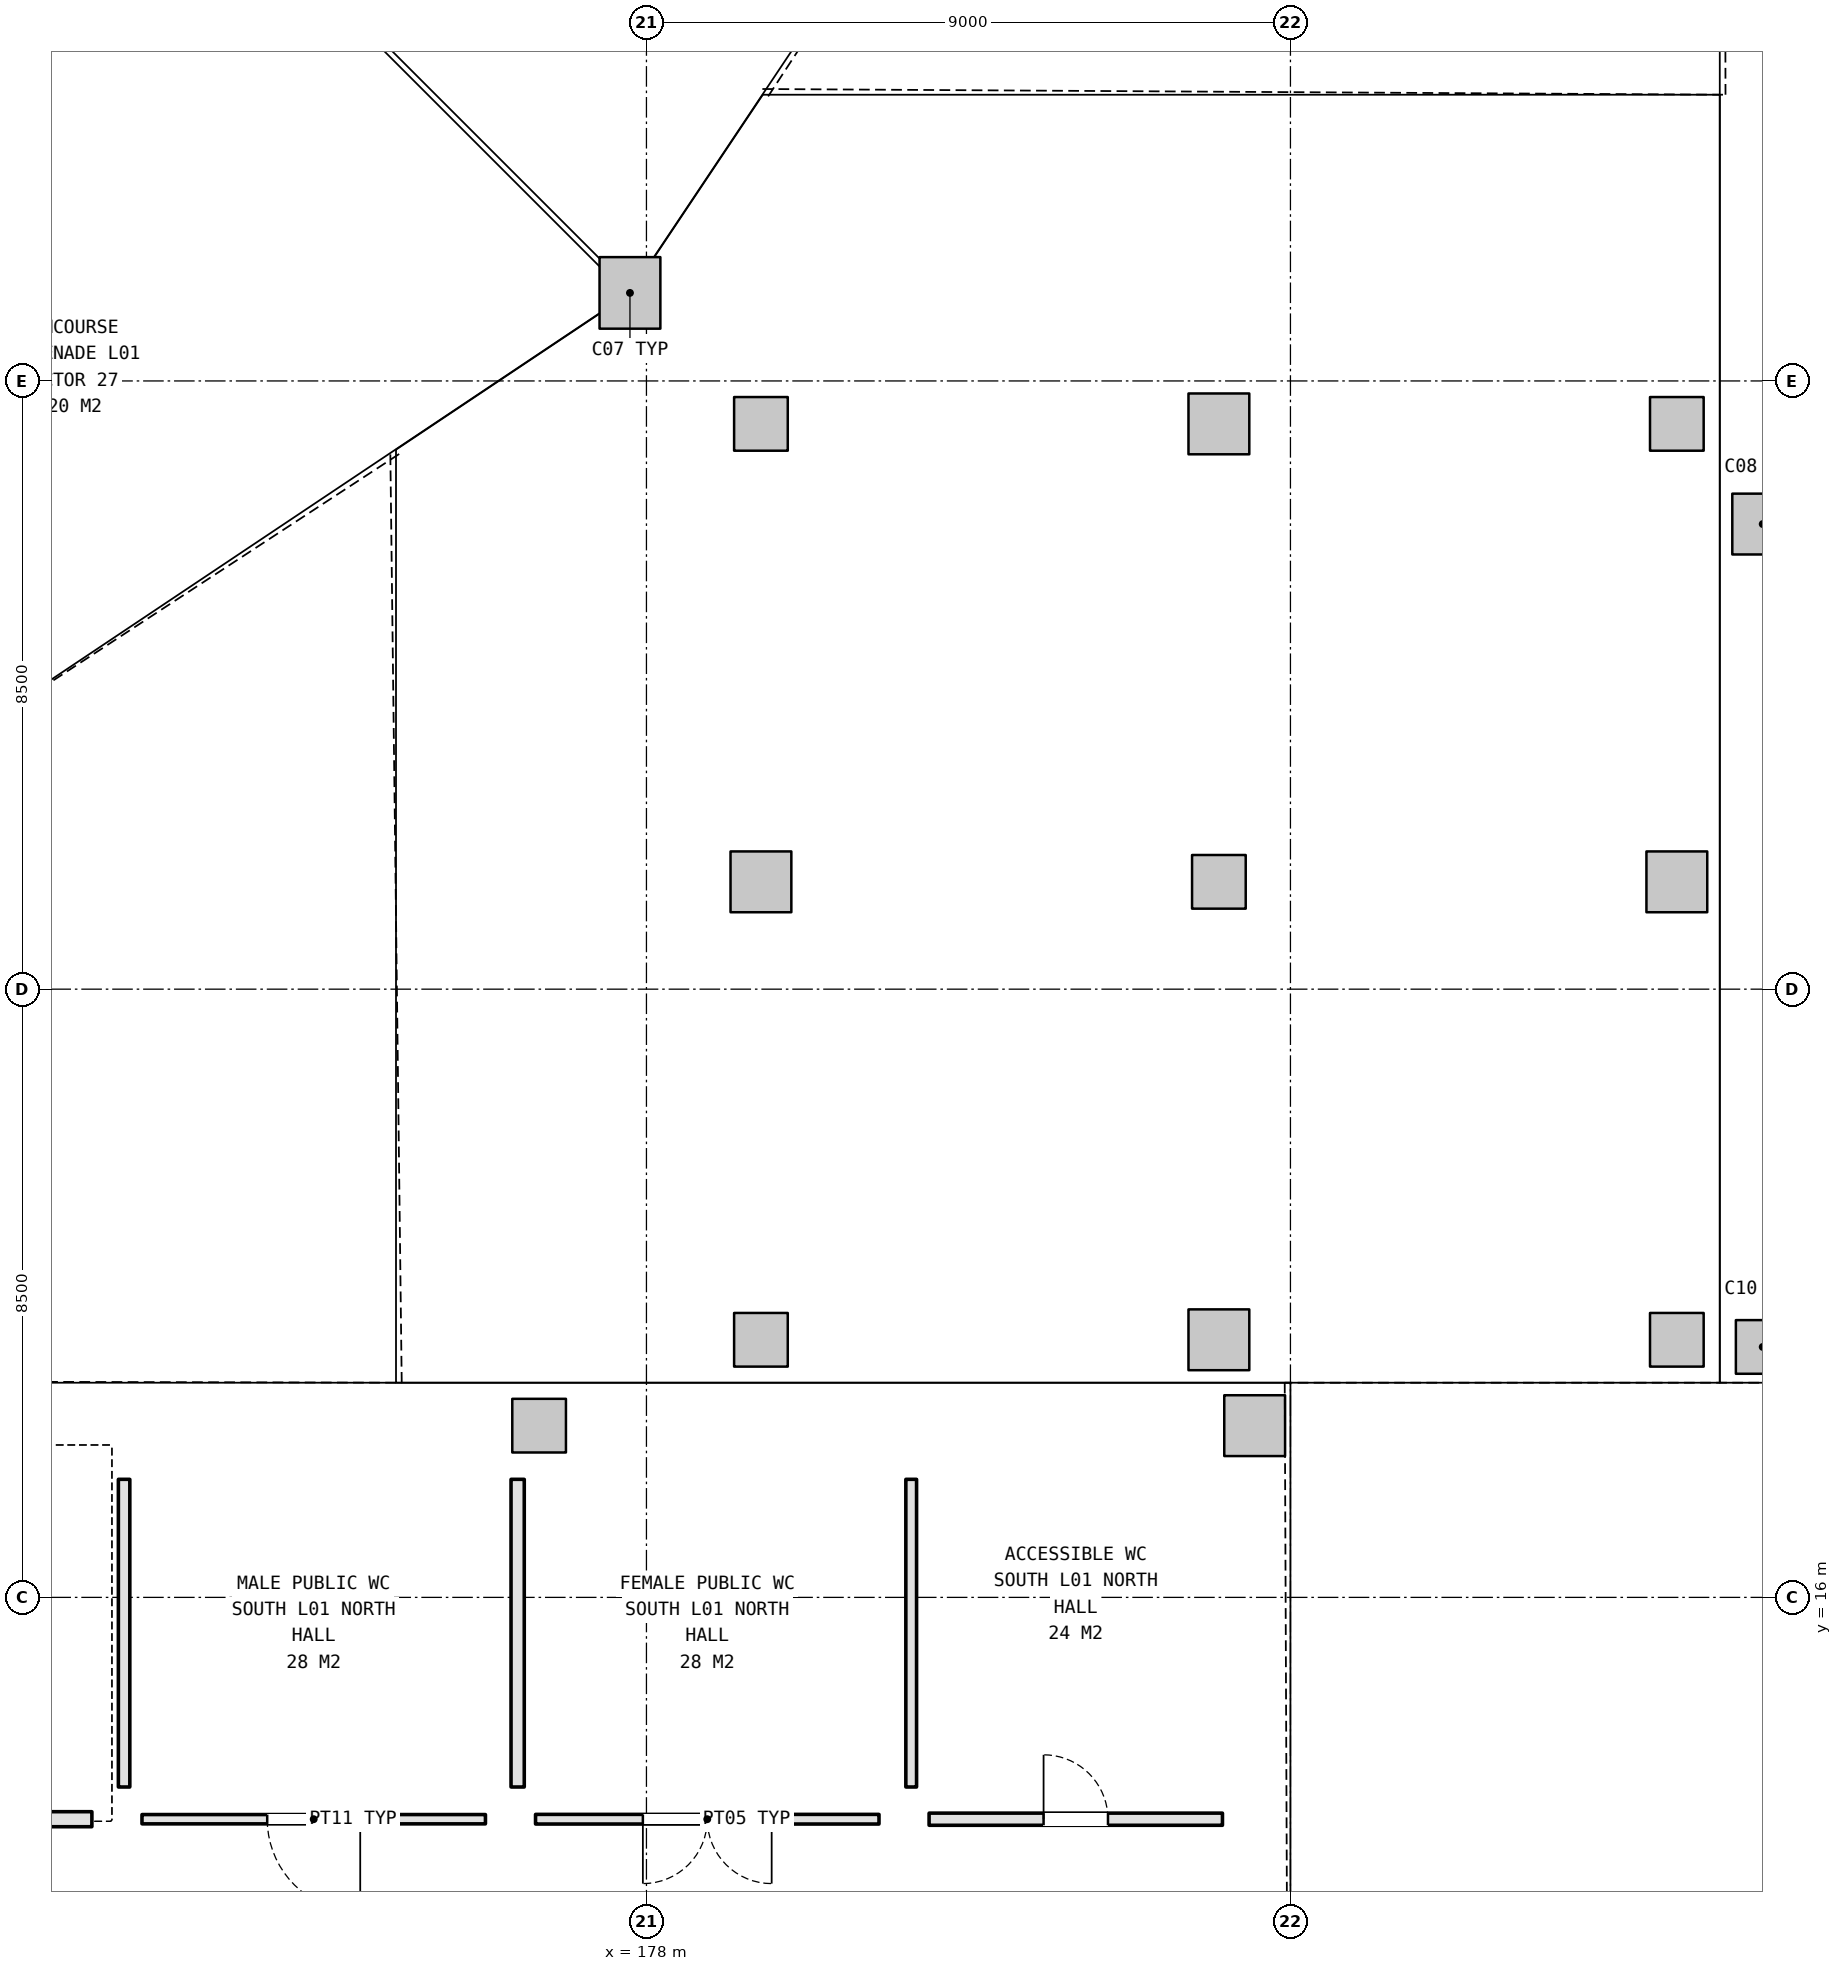
"""IFC4 building model, lengths in metres.
Left out: names, types, materials, properties, quantities, classifications, styles, units other than length and angle.
Written with IfcOpenShell. Run it as: python <this file> out.ifc"""

import sys

from ifc_helpers import new_model, si_unit, direction, frame, frame_2d, origin, origin_2d, place, context, subcontext, project, spatial, rectangle, extrude, element, fill, save


model = new_model("IFC4")
c1 = context("Model", 3, precision=1e-05, world=origin(), true_north=direction((0.0, 1.0)))
c2 = subcontext(c1, "Body", "Model", "MODEL_VIEW")
j1 = project(units=[si_unit("LENGTHUNIT", "METRE"), si_unit("PLANEANGLEUNIT", "RADIAN")], contexts=[c1])
p1 = place(None, origin())
s1 = spatial("IfcSite", under=j1, at=p1, CompositionType="ELEMENT")
p2 = place(p1, origin())
s2 = spatial("IfcBuilding", under=s1, at=p2, CompositionType="ELEMENT")
p3 = place(p2, frame((0.0, 0.0, 5.4)))
s3 = spatial("IfcBuildingStorey", under=s2, at=p3, CompositionType="ELEMENT", Elevation=5.4)
p4 = place(p3, frame((177.77, 34.23, 0.0), z_axis=(0.0, 0.0, 1.0), x_axis=(1.0, 0.0, 0.0)))
e1 = element("IfcColumn", 1, at=p4, inside=s3, PredefinedType="COLUMN", context=c2, shape_type="SweptSolid", body=[
    extrude(rectangle(XDim=0.85, YDim=1.0, at=origin_2d()), origin(), (0.0, 0.0, 1.0), 5.4),
])
p5 = place(p3, frame((193.6, 19.5, 0.0), z_axis=(0.0, 0.0, 1.0), x_axis=(1.0, 0.0, 0.0)))
e2 = element("IfcColumn", 2, at=p5, inside=s3, PredefinedType="COLUMN", context=c2, shape_type="SweptSolid", body=[
    extrude(rectangle(XDim=0.75, YDim=0.75, at=origin_2d()), origin(), (0.0, 0.0, 1.0), 5.4),
])
p6 = place(p3, frame((193.6, 31.0, 0.0), z_axis=(0.0, 0.0, 1.0), x_axis=(1.0, 0.0, 0.0)))
e3 = element("IfcColumn", 3, at=p6, inside=s3, PredefinedType="COLUMN", context=c2, shape_type="SweptSolid", body=[
    extrude(rectangle(XDim=0.85, YDim=0.85, at=origin_2d()), origin(), (0.0, 0.0, 1.0), 5.4),
])
p7 = place(p3, frame((176.5, 18.4, 0.0), z_axis=(0.0, 0.0, 1.0), x_axis=(1.0, 0.0, 0.0)))
e4 = element("IfcColumn", 4, at=p7, inside=s3, PredefinedType="COLUMN", context=c2, shape_type="SweptSolid", body=[
    extrude(rectangle(XDim=0.75, YDim=0.75, at=origin_2d()), origin(), (0.0, 0.0, 1.0), 5.4),
])
p8 = place(p3, frame((186.5, 18.4, 0.0), z_axis=(0.0, 0.0, 1.0), x_axis=(1.0, 0.0, 0.0)))
e5 = element("IfcColumn", 5, at=p8, inside=s3, PredefinedType="COLUMN", context=c2, shape_type="SweptSolid", body=[
    extrude(rectangle(XDim=0.85, YDim=0.85, at=origin_2d()), origin(), (0.0, 0.0, 1.0), 5.4),
])
p9 = place(p3, frame((179.6, 19.6, 0.0), z_axis=(0.0, 0.0, 1.0), x_axis=(1.0, 0.0, 0.0)))
e6 = element("IfcColumn", 6, at=p9, inside=s3, PredefinedType="COLUMN", context=c2, shape_type="SweptSolid", body=[
    extrude(rectangle(XDim=0.75, YDim=0.75, at=origin_2d()), origin(), (0.0, 0.0, 1.0), 5.4),
])
p10 = place(p3, frame((179.6, 26.0, 0.0), z_axis=(0.0, 0.0, 1.0), x_axis=(1.0, 0.0, 0.0)))
e7 = element("IfcColumn", 7, at=p10, inside=s3, PredefinedType="COLUMN", context=c2, shape_type="SweptSolid", body=[
    extrude(rectangle(XDim=0.85, YDim=0.85, at=origin_2d()), origin(), (0.0, 0.0, 1.0), 5.4),
])
p11 = place(p3, frame((179.6, 32.4, 0.0), z_axis=(0.0, 0.0, 1.0), x_axis=(1.0, 0.0, 0.0)))
e8 = element("IfcColumn", 8, at=p11, inside=s3, PredefinedType="COLUMN", context=c2, shape_type="SweptSolid", body=[
    extrude(rectangle(XDim=0.75, YDim=0.75, at=origin_2d()), origin(), (0.0, 0.0, 1.0), 5.4),
])
p12 = place(p3, frame((186.0, 19.6, 0.0), z_axis=(0.0, 0.0, 1.0), x_axis=(1.0, 0.0, 0.0)))
e9 = element("IfcColumn", 9, at=p12, inside=s3, PredefinedType="COLUMN", context=c2, shape_type="SweptSolid", body=[
    extrude(rectangle(XDim=0.85, YDim=0.85, at=origin_2d()), origin(), (0.0, 0.0, 1.0), 5.4),
])
p13 = place(p3, frame((186.0, 26.0, 0.0), z_axis=(0.0, 0.0, 1.0), x_axis=(1.0, 0.0, 0.0)))
e10 = element("IfcColumn", 10, at=p13, inside=s3, PredefinedType="COLUMN", context=c2, shape_type="SweptSolid", body=[
    extrude(rectangle(XDim=0.75, YDim=0.75, at=origin_2d()), origin(), (0.0, 0.0, 1.0), 5.4),
])
p14 = place(p3, frame((186.0, 32.4, 0.0), z_axis=(0.0, 0.0, 1.0), x_axis=(1.0, 0.0, 0.0)))
e11 = element("IfcColumn", 11, at=p14, inside=s3, PredefinedType="COLUMN", context=c2, shape_type="SweptSolid", body=[
    extrude(rectangle(XDim=0.85, YDim=0.85, at=origin_2d()), origin(), (0.0, 0.0, 1.0), 5.4),
])
p15 = place(p3, frame((192.4, 19.6, 0.0), z_axis=(0.0, 0.0, 1.0), x_axis=(1.0, 0.0, 0.0)))
e12 = element("IfcColumn", 12, at=p15, inside=s3, PredefinedType="COLUMN", context=c2, shape_type="SweptSolid", body=[
    extrude(rectangle(XDim=0.75, YDim=0.75, at=origin_2d()), origin(), (0.0, 0.0, 1.0), 5.4),
])
p16 = place(p3, frame((192.4, 26.0, 0.0), z_axis=(0.0, 0.0, 1.0), x_axis=(1.0, 0.0, 0.0)))
e13 = element("IfcColumn", 13, at=p16, inside=s3, PredefinedType="COLUMN", context=c2, shape_type="SweptSolid", body=[
    extrude(rectangle(XDim=0.85, YDim=0.85, at=origin_2d()), origin(), (0.0, 0.0, 1.0), 5.4),
])
p17 = place(p3, frame((192.4, 32.4, 0.0), z_axis=(0.0, 0.0, 1.0), x_axis=(1.0, 0.0, 0.0)))
e14 = element("IfcColumn", 14, at=p17, inside=s3, PredefinedType="COLUMN", context=c2, shape_type="SweptSolid", body=[
    extrude(rectangle(XDim=0.75, YDim=0.75, at=origin_2d()), origin(), (0.0, 0.0, 1.0), 5.4),
])
p18 = place(p3, frame((170.25, 12.9, 0.0), z_axis=(0.0, 0.0, 1.0), x_axis=(-1.0, 0.0, 0.0)))
e15 = element("IfcWall", 15, at=p18, inside=s3, PredefinedType="PLUMBINGWALL", context=c2, shape_type="SweptSolid", body=[
    extrude(rectangle(XDim=17.3, YDim=0.21, at=frame_2d((8.65, 0.0))), origin(), (0.0, 0.0, 1.0), 4.425),
])
p19 = place(p18, frame((8.125, 0.0, 0.0)))
e16 = element("IfcOpeningElement", 16, at=p19, cuts=e15, PredefinedType="OPENING", context=c2, shape_type="SweptSolid", body=[
    extrude(rectangle(XDim=1.05, YDim=2.2, at=frame_2d((0.525, 1.1))), frame((0.0, 0.115, 0.0), z_axis=(0.0, -1.0, 0.0), x_axis=(1.0, 0.0, 0.0)), (0.0, 0.0, 1.0), 0.23),
])
p20 = place(p3, frame((175.75, 12.9, 0.0), z_axis=(0.0, 0.0, 1.0), x_axis=(-1.0, 0.0, 0.0)))
e17 = element("IfcWall", 17, at=p20, inside=s3, PredefinedType="PARTITIONING", context=c2, shape_type="SweptSolid", body=[
    extrude(rectangle(XDim=4.8, YDim=0.13, at=frame_2d((2.4, 0.0))), origin(), (0.0, 0.0, 1.0), 5.12),
])
p21 = place(p20, frame((1.75, 0.0, 0.0)))
e18 = element("IfcOpeningElement", 18, at=p21, cuts=e17, PredefinedType="OPENING", context=c2, shape_type="SweptSolid", body=[
    extrude(rectangle(XDim=1.3, YDim=2.2, at=frame_2d((0.65, 1.1))), frame((0.0, 0.075, 0.0), z_axis=(0.0, -1.0, 0.0), x_axis=(1.0, 0.0, 0.0)), (0.0, 0.0, 1.0), 0.15),
])
p22 = place(p3, frame((170.7, 13.35, 0.0), z_axis=(0.0, 0.0, 1.0), x_axis=(0.0, 1.0, 0.0)))
e19 = element("IfcWall", 19, at=p22, inside=s3, PredefinedType="PARTITIONING", context=c2, shape_type="SweptSolid", body=[
    extrude(rectangle(XDim=4.3, YDim=0.16, at=frame_2d((2.15, 0.0))), origin(), (0.0, 0.0, 1.0), 4.625),
])
p23 = place(p3, frame((181.25, 12.9, 0.0), z_axis=(0.0, 0.0, 1.0), x_axis=(-1.0, 0.0, 0.0)))
e20 = element("IfcWall", 20, at=p23, inside=s3, PredefinedType="PARTITIONING", context=c2, shape_type="SweptSolid", body=[
    extrude(rectangle(XDim=4.8, YDim=0.135, at=frame_2d((2.4, 0.0))), origin(), (0.0, 0.0, 1.0), 4.425),
])
p24 = place(p23, frame((1.5, 0.0, 0.0)))
e21 = element("IfcOpeningElement", 21, at=p24, cuts=e20, PredefinedType="OPENING", context=c2, shape_type="SweptSolid", body=[
    extrude(rectangle(XDim=1.8, YDim=2.2, at=frame_2d((0.9, 1.1))), frame((0.0, 0.077, 0.0), z_axis=(0.0, -1.0, 0.0), x_axis=(1.0, 0.0, 0.0)), (0.0, 0.0, 1.0), 0.155),
])
p25 = place(p3, frame((176.2, 13.35, 0.0), z_axis=(0.0, 0.0, 1.0), x_axis=(0.0, 1.0, 0.0)))
e22 = element("IfcWall", 22, at=p25, inside=s3, PredefinedType="PARTITIONING", context=c2, shape_type="SweptSolid", body=[
    extrude(rectangle(XDim=4.3, YDim=0.185, at=frame_2d((2.15, 0.0))), origin(), (0.0, 0.0, 1.0), 4.425),
])
p26 = place(p3, frame((186.05, 12.9, 0.0), z_axis=(0.0, 0.0, 1.0), x_axis=(-1.0, 0.0, 0.0)))
e23 = element("IfcWall", 23, at=p26, inside=s3, PredefinedType="PARTITIONING", context=c2, shape_type="SweptSolid", body=[
    extrude(rectangle(XDim=4.1, YDim=0.17, at=frame_2d((2.05, 0.0))), origin(), (0.0, 0.0, 1.0), 5.12),
])
p27 = place(p26, frame((1.6, 0.0, 0.0)))
e24 = element("IfcOpeningElement", 24, at=p27, cuts=e23, PredefinedType="OPENING", context=c2, shape_type="SweptSolid", body=[
    extrude(rectangle(XDim=0.9, YDim=2.1, at=frame_2d((0.45, 1.05))), frame((0.0, 0.095, 0.0), z_axis=(0.0, -1.0, 0.0), x_axis=(1.0, 0.0, 0.0)), (0.0, 0.0, 1.0), 0.19),
])
p28 = place(p3, frame((181.7, 13.35, 0.0), z_axis=(0.0, 0.0, 1.0), x_axis=(0.0, 1.0, 0.0)))
e25 = element("IfcWall", 25, at=p28, inside=s3, PredefinedType="PARTITIONING", context=c2, shape_type="SweptSolid", body=[
    extrude(rectangle(XDim=4.3, YDim=0.15, at=frame_2d((2.15, 0.0))), origin(), (0.0, 0.0, 1.0), 4.625),
])
p29 = place(p3, frame((172.188, 39.466, 0.0), z_axis=(0.0, 0.0, 1.0), x_axis=(-0.831467963177, -0.555572701103, 0.0)))
e26 = element("IfcWall", 26, at=p29, inside=s3, PredefinedType="PARTITIONING", context=c2, shape_type="SweptSolid", body=[
    extrude(rectangle(XDim=16.783, YDim=0.16, at=frame_2d((8.392, 0.0))), origin(), (0.0, 0.0, 1.0), 4.345),
])
p30 = place(p29, frame((7.892, 0.0, 0.0)))
e27 = element("IfcOpeningElement", 27, at=p30, cuts=e26, PredefinedType="OPENING", context=c2, shape_type="SweptSolid", body=[
    extrude(rectangle(XDim=1.0, YDim=2.1, at=frame_2d((0.5, 1.05))), frame((0.0, 0.09, 0.0), z_axis=(0.0, -1.0, 0.0), x_axis=(1.0, 0.0, 0.0)), (0.0, 0.0, 1.0), 0.18),
])
p31 = place(p21, origin())
e28 = element("IfcDoor", 28, at=p31, inside=s3, OperationType="SINGLE_SWING_LEFT", PredefinedType="DOOR", context=c2, shape_type="SweptSolid", body=[
    extrude(rectangle(XDim=1.3, YDim=2.2, at=frame_2d((0.65, 1.1))), frame((0.0, 0.025, 0.0), z_axis=(0.0, -1.0, 0.0), x_axis=(1.0, 0.0, 0.0)), (0.0, 0.0, 1.0), 0.05),
])
fill(e18, e28)
p32 = place(p24, origin())
e29 = element("IfcDoor", 29, at=p32, inside=s3, OperationType="DOUBLE_DOOR_SINGLE_SWING", PredefinedType="DOOR", context=c2, shape_type="SweptSolid", body=[
    extrude(rectangle(XDim=1.8, YDim=2.2, at=frame_2d((0.9, 1.1))), frame((0.0, 0.025, 0.0), z_axis=(0.0, -1.0, 0.0), x_axis=(1.0, 0.0, 0.0)), (0.0, 0.0, 1.0), 0.05),
])
fill(e21, e29)
p33 = place(p27, frame((0.9, 0.0, 0.0), z_axis=(0.0, 0.0, 1.0), x_axis=(-1.0, 0.0, 0.0)))
e30 = element("IfcDoor", 30, at=p33, inside=s3, OperationType="SINGLE_SWING_RIGHT", PredefinedType="DOOR", context=c2, shape_type="SweptSolid", body=[
    extrude(rectangle(XDim=0.9, YDim=2.1, at=frame_2d((0.45, 1.05))), frame((0.0, 0.025, 0.0), z_axis=(0.0, -1.0, 0.0), x_axis=(1.0, 0.0, 0.0)), (0.0, 0.0, 1.0), 0.05),
])
fill(e24, e30)
save(model, sys.argv[1])
